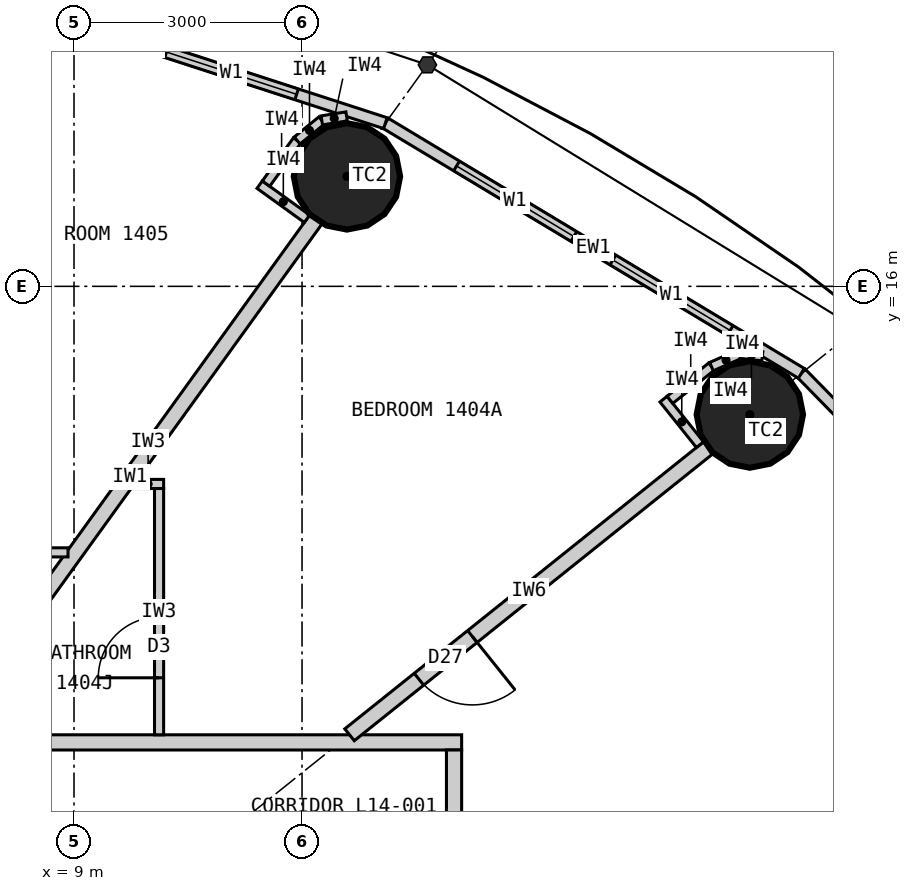
"""IFC4 building model, lengths in metres.
Left out: names, types, materials, properties, quantities, classifications, styles, units other than length and angle.
Written with IfcOpenShell. Run it as: python <this file> out.ifc"""

import sys

from ifc_helpers import new_model, si_unit, direction, frame, frame_2d, origin, origin_2d, place, context, subcontext, project, spatial, rectangle, circle, extrude, element, fill, save


model = new_model("IFC4")
c1 = context("Model", 3, precision=1e-05, world=origin(), true_north=direction((0.0, 1.0)))
c2 = subcontext(c1, "Body", "Model", "MODEL_VIEW")
j1 = project(units=[si_unit("LENGTHUNIT", "METRE"), si_unit("PLANEANGLEUNIT", "RADIAN")], contexts=[c1])
p1 = place(None, origin())
s1 = spatial("IfcSite", under=j1, at=p1, CompositionType="ELEMENT")
p2 = place(p1, origin())
s2 = spatial("IfcBuilding", under=s1, at=p2, CompositionType="ELEMENT")
p3 = place(p2, frame((0.0, 0.0, 60.6)))
s3 = spatial("IfcBuildingStorey", under=s2, at=p3, CompositionType="ELEMENT", Elevation=60.6)
for number, where, z_axis, x_axis in (
    (1, (17.892, 14.313, 0.0), (0.0, 0.0, 1.0), (1.0, 0.0, 0.0)),
    (2, (12.591, 17.447, 0.0), (0.0, 0.0, 1.0), (1.0, 0.0, 0.0)),
):
    element("IfcColumn", number, at=place(p3, frame(where, z_axis=z_axis, x_axis=x_axis)), inside=s3, PredefinedType="COLUMN", context=c2, shape_type="SweptSolid", body=[
        extrude(circle(Radius=0.7, at=origin_2d()), origin(), (0.0, 0.0, 1.0), 3.3),
    ])
p4 = place(p3, frame((22.803, 10.532, 0.0), z_axis=(0.0, 0.0, 1.0), x_axis=(-0.699602905915, 0.714531856557, 0.0)))
e3 = element("IfcWall", 3, at=p4, inside=s3, PredefinedType="ELEMENTEDWALL", context=c2, shape_type="SweptSolid", body=[
    extrude(rectangle(XDim=6.051, YDim=0.15, at=frame_2d((3.025, 0.0))), origin(), (0.0, 0.0, 1.0), 3.12),
])
p5 = place(p4, frame((0.926, 0.0, 0.9)))
e4 = element("IfcOpeningElement", 4, at=p5, cuts=e3, PredefinedType="OPENING", context=c2, shape_type="SweptSolid", body=[
    extrude(rectangle(XDim=1.8, YDim=1.9, at=frame_2d((0.9, 0.95))), frame((0.0, 0.085, 0.0), z_axis=(0.0, -1.0, 0.0), x_axis=(1.0, 0.0, 0.0)), (0.0, 0.0, 1.0), 0.17),
])
p6 = place(p4, frame((3.325, 0.0, 0.9)))
e5 = element("IfcOpeningElement", 5, at=p6, cuts=e3, PredefinedType="OPENING", context=c2, shape_type="SweptSolid", body=[
    extrude(rectangle(XDim=1.8, YDim=1.9, at=frame_2d((0.9, 0.95))), frame((0.0, 0.085, 0.0), z_axis=(0.0, -1.0, 0.0), x_axis=(1.0, 0.0, 0.0)), (0.0, 0.0, 1.0), 0.17),
])
p7 = place(p3, frame((18.57, 14.856, 0.0), z_axis=(0.0, 0.0, 1.0), x_axis=(-0.856983180864, 0.515344377787, 0.0)))
e6 = element("IfcWall", 6, at=p7, inside=s3, PredefinedType="ELEMENTEDWALL", context=c2, shape_type="SweptSolid", body=[
    extrude(rectangle(XDim=6.386, YDim=0.15, at=frame_2d((3.193, 0.0))), origin(), (0.0, 0.0, 1.0), 3.12),
])
p8 = place(p7, frame((1.093, 0.0, 0.9)))
e7 = element("IfcOpeningElement", 7, at=p8, cuts=e6, PredefinedType="OPENING", context=c2, shape_type="SweptSolid", body=[
    extrude(rectangle(XDim=1.8, YDim=1.9, at=frame_2d((0.9, 0.95))), frame((0.0, 0.085, 0.0), z_axis=(0.0, -1.0, 0.0), x_axis=(1.0, 0.0, 0.0)), (0.0, 0.0, 1.0), 0.17),
])
p9 = place(p7, frame((3.493, 0.0, 0.9)))
e8 = element("IfcOpeningElement", 8, at=p9, cuts=e6, PredefinedType="OPENING", context=c2, shape_type="SweptSolid", body=[
    extrude(rectangle(XDim=1.8, YDim=1.9, at=frame_2d((0.9, 0.95))), frame((0.0, 0.085, 0.0), z_axis=(0.0, -1.0, 0.0), x_axis=(1.0, 0.0, 0.0)), (0.0, 0.0, 1.0), 0.17),
])
p10 = place(p3, frame((13.096, 18.147, 0.0), z_axis=(0.0, 0.0, 1.0), x_axis=(-0.951137534625, 0.308767534285, 0.0)))
e9 = element("IfcWall", 9, at=p10, inside=s3, PredefinedType="ELEMENTEDWALL", context=c2, shape_type="SweptSolid", body=[
    extrude(rectangle(XDim=6.655, YDim=0.15, at=frame_2d((3.328, 0.0))), origin(), (0.0, 0.0, 1.0), 3.12),
])
p11 = place(p10, frame((1.228, 0.0, 0.9)))
e10 = element("IfcOpeningElement", 10, at=p11, cuts=e9, PredefinedType="OPENING", context=c2, shape_type="SweptSolid", body=[
    extrude(rectangle(XDim=1.8, YDim=1.9, at=frame_2d((0.9, 0.95))), frame((0.0, 0.085, 0.0), z_axis=(0.0, -1.0, 0.0), x_axis=(1.0, 0.0, 0.0)), (0.0, 0.0, 1.0), 0.17),
])
p12 = place(p10, frame((3.628, 0.0, 0.9)))
e11 = element("IfcOpeningElement", 11, at=p12, cuts=e9, PredefinedType="OPENING", context=c2, shape_type="SweptSolid", body=[
    extrude(rectangle(XDim=1.8, YDim=1.9, at=frame_2d((0.9, 0.95))), frame((0.0, 0.085, 0.0), z_axis=(0.0, -1.0, 0.0), x_axis=(1.0, 0.0, 0.0)), (0.0, 0.0, 1.0), 0.17),
])
p13 = place(p3, frame((-14.1, 10.0, 0.0), z_axis=(0.0, 0.0, 1.0), x_axis=(1.0, 0.0, 0.0)))
e12 = element("IfcWall", 12, at=p13, inside=s3, PredefinedType="PARTITIONING", context=c2, shape_type="SweptSolid", body=[
    extrude(rectangle(XDim=28.2, YDim=0.2, at=frame_2d((14.1, 0.0))), origin(), (0.0, 0.0, 1.0), 3.12),
])
p14 = place(p13, frame((18.529, 0.0, 0.0)))
e13 = element("IfcOpeningElement", 13, at=p14, cuts=e12, PredefinedType="OPENING", context=c2, shape_type="SweptSolid", body=[
    extrude(rectangle(XDim=1.0, YDim=2.2, at=frame_2d((0.5, 1.1))), frame((0.0, 0.11, 0.0), z_axis=(0.0, -1.0, 0.0), x_axis=(1.0, 0.0, 0.0)), (0.0, 0.0, 1.0), 0.22),
])
p15 = place(p13, frame((14.623, 0.0, 0.0)))
e14 = element("IfcOpeningElement", 14, at=p15, cuts=e12, PredefinedType="OPENING", context=c2, shape_type="SweptSolid", body=[
    extrude(rectangle(XDim=1.0, YDim=2.2, at=frame_2d((0.5, 1.1))), frame((0.0, 0.11, 0.0), z_axis=(0.0, -1.0, 0.0), x_axis=(1.0, 0.0, 0.0)), (0.0, 0.0, 1.0), 0.22),
])
p16 = place(p13, frame((11.24, 0.0, 0.0)))
e15 = element("IfcOpeningElement", 15, at=p16, cuts=e12, PredefinedType="OPENING", context=c2, shape_type="SweptSolid", body=[
    extrude(rectangle(XDim=1.0, YDim=2.2, at=frame_2d((0.5, 1.1))), frame((0.0, 0.11, 0.0), z_axis=(0.0, -1.0, 0.0), x_axis=(1.0, 0.0, 0.0)), (0.0, 0.0, 1.0), 0.22),
])
p17 = place(p13, frame((8.671, 0.0, 0.0)))
e16 = element("IfcOpeningElement", 16, at=p17, cuts=e12, PredefinedType="OPENING", context=c2, shape_type="SweptSolid", body=[
    extrude(rectangle(XDim=1.0, YDim=2.2, at=frame_2d((0.5, 1.1))), frame((0.0, 0.11, 0.0), z_axis=(0.0, -1.0, 0.0), x_axis=(1.0, 0.0, 0.0)), (0.0, 0.0, 1.0), 0.22),
])
p18 = place(p13, frame((2.801, 0.0, 0.0)))
e17 = element("IfcOpeningElement", 17, at=p18, cuts=e12, PredefinedType="OPENING", context=c2, shape_type="SweptSolid", body=[
    extrude(rectangle(XDim=1.0, YDim=2.2, at=frame_2d((0.5, 1.1))), frame((0.0, 0.11, 0.0), z_axis=(0.0, -1.0, 0.0), x_axis=(1.0, 0.0, 0.0)), (0.0, 0.0, 1.0), 0.22),
])
p19 = place(p3, frame((14.0, -9.9, 0.0), z_axis=(0.0, 0.0, 1.0), x_axis=(0.0, 1.0, 0.0)))
e18 = element("IfcWall", 18, at=p19, inside=s3, PredefinedType="PARTITIONING", context=c2, shape_type="SweptSolid", body=[
    extrude(rectangle(XDim=19.8, YDim=0.2, at=frame_2d((9.9, 0.0))), origin(), (0.0, 0.0, 1.0), 3.12),
])
p20 = place(p19, frame((0.103, 0.0, 0.0)))
e19 = element("IfcOpeningElement", 19, at=p20, cuts=e18, PredefinedType="OPENING", context=c2, shape_type="SweptSolid", body=[
    extrude(rectangle(XDim=1.0, YDim=2.2, at=frame_2d((0.5, 1.1))), frame((0.0, 0.11, 0.0), z_axis=(0.0, -1.0, 0.0), x_axis=(1.0, 0.0, 0.0)), (0.0, 0.0, 1.0), 0.22),
])
p21 = place(p19, frame((5.248, 0.0, 0.0)))
e20 = element("IfcOpeningElement", 20, at=p21, cuts=e18, PredefinedType="OPENING", context=c2, shape_type="SweptSolid", body=[
    extrude(rectangle(XDim=1.0, YDim=2.2, at=frame_2d((0.5, 1.1))), frame((0.0, 0.11, 0.0), z_axis=(0.0, -1.0, 0.0), x_axis=(1.0, 0.0, 0.0)), (0.0, 0.0, 1.0), 0.22),
])
p22 = place(p19, frame((8.438, 0.0, 0.0)))
e21 = element("IfcOpeningElement", 21, at=p22, cuts=e18, PredefinedType="OPENING", context=c2, shape_type="SweptSolid", body=[
    extrude(rectangle(XDim=1.0, YDim=2.2, at=frame_2d((0.5, 1.1))), frame((0.0, 0.11, 0.0), z_axis=(0.0, -1.0, 0.0), x_axis=(1.0, 0.0, 0.0)), (0.0, 0.0, 1.0), 0.22),
])
p23 = place(p19, frame((14.532, 0.0, 0.0)))
e22 = element("IfcOpeningElement", 22, at=p23, cuts=e18, PredefinedType="OPENING", context=c2, shape_type="SweptSolid", body=[
    extrude(rectangle(XDim=1.0, YDim=2.2, at=frame_2d((0.5, 1.1))), frame((0.0, 0.11, 0.0), z_axis=(0.0, -1.0, 0.0), x_axis=(1.0, 0.0, 0.0)), (0.0, 0.0, 1.0), 0.22),
])
p24 = place(p3, frame((12.625, 10.1, 0.0), z_axis=(0.0, 0.0, 1.0), x_axis=(0.780892451574, 0.624665493744, 0.0)))
e23 = element("IfcWall", 23, at=p24, inside=s3, PredefinedType="PARTITIONING", context=c2, shape_type="SweptSolid", body=[
    extrude(rectangle(XDim=6.045, YDim=0.2, at=frame_2d((3.022, 0.0))), origin(), (0.0, 0.0, 1.0), 2.32),
])
p25 = place(p24, frame((1.17, 0.0, 0.0)))
e24 = element("IfcOpeningElement", 24, at=p25, cuts=e23, PredefinedType="OPENING", context=c2, shape_type="SweptSolid", body=[
    extrude(rectangle(XDim=0.9, YDim=2.1, at=frame_2d((0.45, 1.05))), frame((0.0, 0.11, 0.0), z_axis=(0.0, -1.0, 0.0), x_axis=(1.0, 0.0, 0.0)), (0.0, 0.0, 1.0), 0.22),
])
p26 = place(p3, frame((7.289, 10.1, 0.0), z_axis=(0.0, 0.0, 1.0), x_axis=(0.585198353053, 0.810890182197, 0.0)))
e25 = element("IfcWall", 25, at=p26, inside=s3, PredefinedType="PARTITIONING", context=c2, shape_type="SweptSolid", body=[
    extrude(rectangle(XDim=8.36, YDim=0.2, at=frame_2d((4.18, 0.0))), origin(), (0.0, 0.0, 1.0), 2.32),
])
p27 = place(p3, frame((9.771, 13.4, 0.0), z_axis=(0.0, 0.0, 1.0), x_axis=(1.0, 0.0, 0.0)))
e26 = element("IfcWall", 26, at=p27, inside=s3, PredefinedType="PARTITIONING", context=c2, shape_type="SweptSolid", body=[
    extrude(rectangle(XDim=0.408, YDim=0.12, at=frame_2d((0.204, 0.0))), origin(), (0.0, 0.0, 1.0), 3.12),
])
p28 = place(p3, frame((10.119, 10.1, 0.0), z_axis=(0.0, 0.0, 1.0), x_axis=(0.0, 1.0, 0.0)))
e27 = element("IfcWall", 27, at=p28, inside=s3, PredefinedType="PARTITIONING", context=c2, shape_type="SweptSolid", body=[
    extrude(rectangle(XDim=3.24, YDim=0.12, at=frame_2d((1.62, 0.0))), origin(), (0.0, 0.0, 1.0), 3.12),
])
p29 = place(p28, frame((0.75, 0.0, 0.0)))
e28 = element("IfcOpeningElement", 28, at=p29, cuts=e27, PredefinedType="OPENING", context=c2, shape_type="SweptSolid", body=[
    extrude(rectangle(XDim=0.8, YDim=2.1, at=frame_2d((0.4, 1.05))), frame((0.0, 0.07, 0.0), z_axis=(0.0, -1.0, 0.0), x_axis=(1.0, 0.0, 0.0)), (0.0, 0.0, 1.0), 0.14),
])
p30 = place(p3, frame((8.921, 12.5, 0.0), z_axis=(0.0, 0.0, 1.0), x_axis=(-1.0, 0.0, 0.0)))
e29 = element("IfcWall", 29, at=p30, inside=s3, PredefinedType="PARTITIONING", context=c2, shape_type="SweptSolid", body=[
    extrude(rectangle(XDim=3.372, YDim=0.12, at=frame_2d((1.686, 0.0))), origin(), (0.0, 0.0, 1.0), 3.12),
])
p31 = place(p3, frame((17.236, 13.917, 0.0), z_axis=(0.0, 0.0, 1.0), x_axis=(-0.624695047554, 0.780868809443, 0.0)))
e30 = element("IfcWall", 30, at=p31, inside=s3, PredefinedType="PARTITIONING", context=c2, shape_type="SweptSolid", body=[
    extrude(rectangle(XDim=0.768, YDim=0.12, at=frame_2d((0.384, 0.0))), origin(), (0.0, 0.0, 1.0), 3.12),
])
p32 = place(p3, frame((16.841, 14.507, 0.0), z_axis=(0.0, 0.0, 1.0), x_axis=(0.780902834923, 0.62465251333, 0.0)))
e31 = element("IfcWall", 31, at=p32, inside=s3, PredefinedType="PARTITIONING", context=c2, shape_type="SweptSolid", body=[
    extrude(rectangle(XDim=0.7, YDim=0.12, at=frame_2d((0.35, 0.0))), origin(), (0.0, 0.0, 1.0), 3.12),
])
p33 = place(p3, frame((17.387, 14.944, 0.0), z_axis=(0.0, 0.0, 1.0), x_axis=(0.916036698064, 0.401094462441, 0.0)))
e32 = element("IfcWall", 32, at=p33, inside=s3, PredefinedType="PARTITIONING", context=c2, shape_type="SweptSolid", body=[
    extrude(rectangle(XDim=0.418, YDim=0.12, at=frame_2d((0.209, 0.0))), origin(), (0.0, 0.0, 1.0), 3.12),
])
p34 = place(p3, frame((17.77, 15.112, 0.0), z_axis=(0.0, 0.0, 1.0), x_axis=(0.993904401174, -0.110245368731, 0.0)))
e33 = element("IfcWall", 33, at=p34, inside=s3, PredefinedType="PARTITIONING", context=c2, shape_type="SweptSolid", body=[
    extrude(rectangle(XDim=0.288, YDim=0.12, at=frame_2d((0.144, 0.0))), origin(), (0.0, 0.0, 1.0), 3.12),
])
p35 = place(p3, frame((12.065, 16.889, 0.0), z_axis=(0.0, 0.0, 1.0), x_axis=(-0.810821798253, 0.585293098778, 0.0)))
e34 = element("IfcWall", 34, at=p35, inside=s3, PredefinedType="PARTITIONING", context=c2, shape_type="SweptSolid", body=[
    extrude(rectangle(XDim=0.768, YDim=0.12, at=frame_2d((0.384, 0.0))), origin(), (0.0, 0.0, 1.0), 3.12),
])
p36 = place(p3, frame((11.526, 17.351, 0.0), z_axis=(0.0, 0.0, 1.0), x_axis=(0.585223113993, 0.810872312296, 0.0)))
e35 = element("IfcWall", 35, at=p36, inside=s3, PredefinedType="PARTITIONING", context=c2, shape_type="SweptSolid", body=[
    extrude(rectangle(XDim=0.7, YDim=0.12, at=frame_2d((0.35, 0.0))), origin(), (0.0, 0.0, 1.0), 3.12),
])
p37 = place(p3, frame((11.936, 17.919, 0.0), z_axis=(0.0, 0.0, 1.0), x_axis=(0.775023088441, 0.631932917629, 0.0)))
e36 = element("IfcWall", 36, at=p37, inside=s3, PredefinedType="PARTITIONING", context=c2, shape_type="SweptSolid", body=[
    extrude(rectangle(XDim=0.418, YDim=0.12, at=frame_2d((0.209, 0.0))), origin(), (0.0, 0.0, 1.0), 3.12),
])
p38 = place(p3, frame((12.26, 18.183, 0.0), z_axis=(0.0, 0.0, 1.0), x_axis=(0.987218661664, 0.159371622511, 0.0)))
e37 = element("IfcWall", 37, at=p38, inside=s3, PredefinedType="PARTITIONING", context=c2, shape_type="SweptSolid", body=[
    extrude(rectangle(XDim=0.331, YDim=0.12, at=frame_2d((0.166, 0.0))), origin(), (0.0, 0.0, 1.0), 3.12),
])
p39 = place(p8, origin())
e38 = element("IfcWindow", 38, at=p39, inside=s3, PartitioningType="SINGLE_PANEL", PredefinedType="WINDOW", context=c2, shape_type="SweptSolid", body=[
    extrude(rectangle(XDim=1.8, YDim=1.9, at=frame_2d((0.9, 0.95))), frame((0.0, 0.03, 0.0), z_axis=(0.0, -1.0, 0.0), x_axis=(1.0, 0.0, 0.0)), (0.0, 0.0, 1.0), 0.06),
])
fill(e7, e38)
p40 = place(p9, origin())
e39 = element("IfcWindow", 39, at=p40, inside=s3, PartitioningType="SINGLE_PANEL", PredefinedType="WINDOW", context=c2, shape_type="SweptSolid", body=[
    extrude(rectangle(XDim=1.8, YDim=1.9, at=frame_2d((0.9, 0.95))), frame((0.0, 0.03, 0.0), z_axis=(0.0, -1.0, 0.0), x_axis=(1.0, 0.0, 0.0)), (0.0, 0.0, 1.0), 0.06),
])
fill(e8, e39)
p41 = place(p11, origin())
e40 = element("IfcWindow", 40, at=p41, inside=s3, PartitioningType="SINGLE_PANEL", PredefinedType="WINDOW", context=c2, shape_type="SweptSolid", body=[
    extrude(rectangle(XDim=1.8, YDim=1.9, at=frame_2d((0.9, 0.95))), frame((0.0, 0.03, 0.0), z_axis=(0.0, -1.0, 0.0), x_axis=(1.0, 0.0, 0.0)), (0.0, 0.0, 1.0), 0.06),
])
fill(e10, e40)
p42 = place(p29, origin())
e41 = element("IfcDoor", 41, at=p42, inside=s3, OperationType="SINGLE_SWING_LEFT", PredefinedType="DOOR", context=c2, shape_type="SweptSolid", body=[
    extrude(rectangle(XDim=0.8, YDim=2.1, at=frame_2d((0.4, 1.05))), frame((0.0, 0.025, 0.0), z_axis=(0.0, -1.0, 0.0), x_axis=(1.0, 0.0, 0.0)), (0.0, 0.0, 1.0), 0.05),
])
fill(e28, e41)
p43 = place(p25, origin())
e42 = element("IfcDoor", 42, at=p43, inside=s3, OperationType="SINGLE_SWING_RIGHT", PredefinedType="DOOR", context=c2, shape_type="SweptSolid", body=[
    extrude(rectangle(XDim=0.9, YDim=2.1, at=frame_2d((0.45, 1.05))), frame((0.0, 0.025, 0.0), z_axis=(0.0, -1.0, 0.0), x_axis=(1.0, 0.0, 0.0)), (0.0, 0.0, 1.0), 0.05),
])
fill(e24, e42)
save(model, sys.argv[1])
